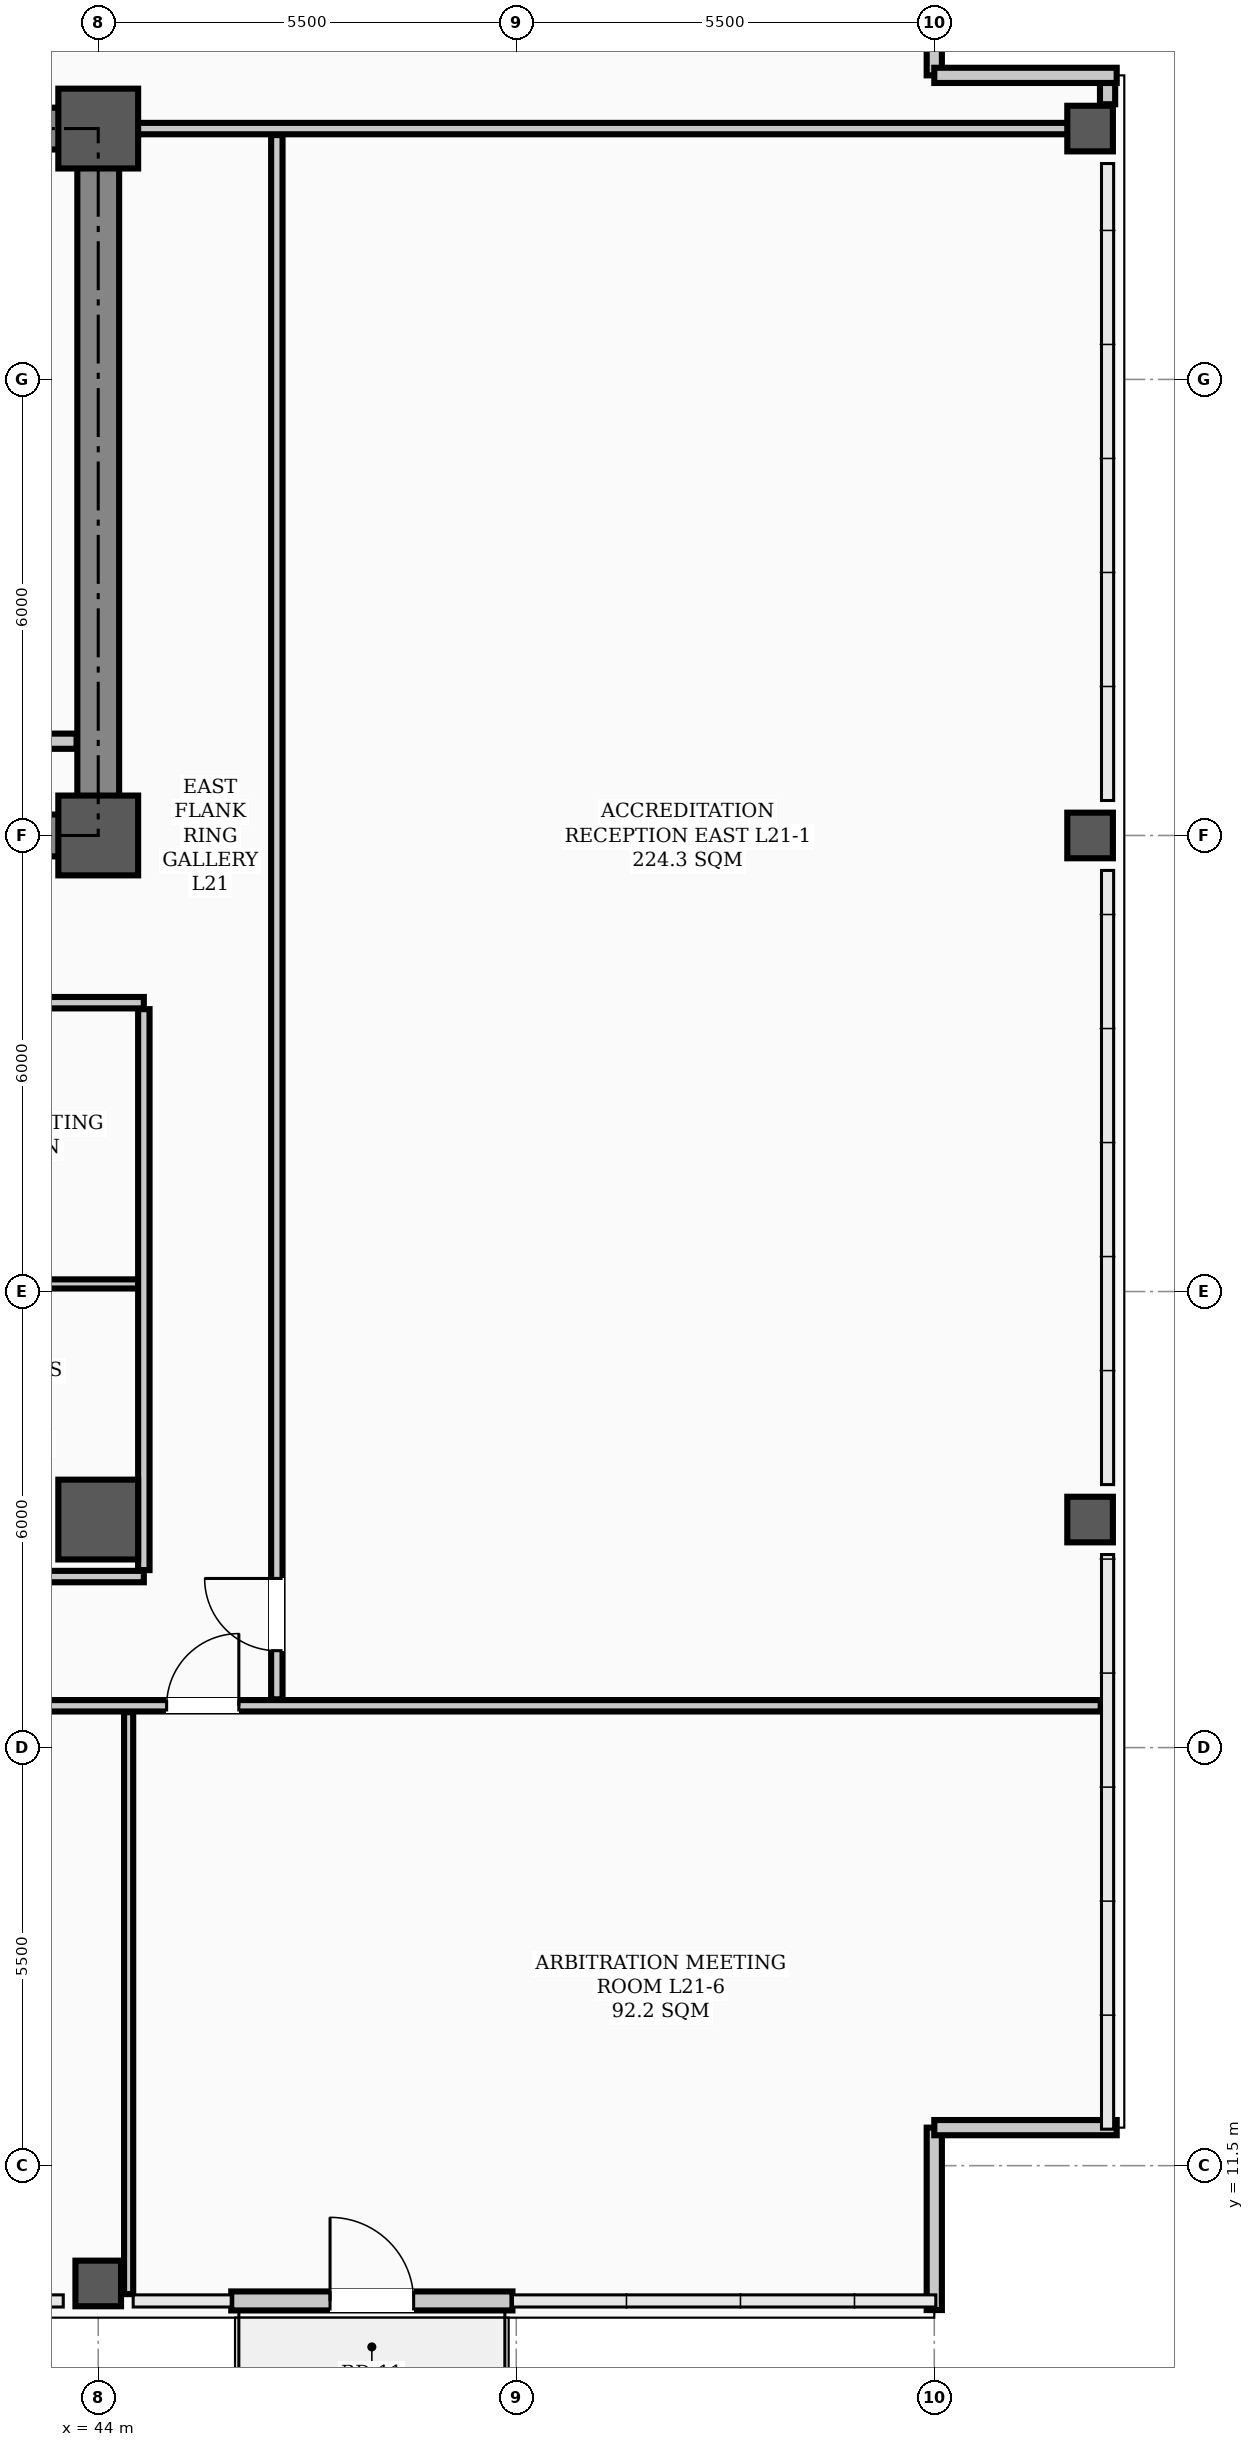
"""IFC4 building model, lengths in metres.
Left out: names, types, materials, properties, quantities, classifications, styles, units other than length and angle.
Written with IfcOpenShell. Run it as: python <this file> out.ifc"""

import sys

from ifc_helpers import new_model, si_unit, direction, frame, frame_2d, origin, origin_2d, place, context, subcontext, project, spatial, rectangle, hollow_rectangle, extrude, element, fill, save


model = new_model("IFC4")
c1 = context("Model", 3, precision=1e-05, world=origin(), true_north=direction((0.0, 1.0)))
c2 = subcontext(c1, "Body", "Model", "MODEL_VIEW")
j1 = project(units=[si_unit("LENGTHUNIT", "METRE"), si_unit("PLANEANGLEUNIT", "RADIAN")], contexts=[c1])
p1 = place(None, origin())
s1 = spatial("IfcSite", under=j1, at=p1, CompositionType="ELEMENT")
p2 = place(p1, origin())
s2 = spatial("IfcBuilding", under=s1, at=p2, CompositionType="ELEMENT")
p3 = place(p2, frame((0.0, 0.0, 85.0)))
s3 = spatial("IfcBuildingStorey", under=s2, at=p3, CompositionType="ELEMENT", Elevation=85.0)
for number, where, z_axis, x_axis in (
    (1, (44.0, 29.0, 0.0), (0.0, 0.0, 1.0), (1.0, 0.0, 0.0)),
    (2, (44.0, 38.3, 0.0), (0.0, 0.0, 1.0), (1.0, 0.0, 0.0)),
    (3, (44.0, 20.0, 0.0), (0.0, 0.0, 1.0), (1.0, 0.0, 0.0)),
):
    element("IfcColumn", number, at=place(p3, frame(where, z_axis=z_axis, x_axis=x_axis)), inside=s3, PredefinedType="COLUMN", context=c2, shape_type="SweptSolid", body=[
        extrude(hollow_rectangle(XDim=1.05, YDim=1.05, WallThickness=0.038, InnerFilletRadius=0.019, OuterFilletRadius=0.057, at=origin_2d()), origin(), (0.0, 0.0, 1.0), 3.9),
    ])
for number, where, z_axis, x_axis in (
    (4, (44.0, 9.95, 0.0), (0.0, 0.0, 1.0), (1.0, 0.0, 0.0)),
    (5, (57.05, 20.0, 0.0), (0.0, 0.0, 1.0), (1.0, 0.0, 0.0)),
    (6, (57.05, 29.0, 0.0), (0.0, 0.0, 1.0), (1.0, 0.0, 0.0)),
    (7, (57.05, 38.3, 0.0), (0.0, 0.0, 1.0), (1.0, 0.0, 0.0)),
):
    element("IfcColumn", number, at=place(p3, frame(where, z_axis=z_axis, x_axis=x_axis)), inside=s3, PredefinedType="COLUMN", context=c2, shape_type="SweptSolid", body=[
        extrude(hollow_rectangle(XDim=0.6, YDim=0.6, WallThickness=0.026, InnerFilletRadius=0.013, OuterFilletRadius=0.039, at=origin_2d()), origin(), (0.0, 0.0, 1.0), 3.9),
    ])
p4 = place(p3, frame((57.28, 38.62, 0.0), z_axis=(0.0, 0.0, 1.0), x_axis=(0.0, 1.0, 0.0)))
e8 = element("IfcWall", 8, at=p4, inside=s3, PredefinedType="PARAPET", context=c2, shape_type="SweptSolid", body=[
    extrude(rectangle(XDim=0.28, YDim=0.2, at=frame_2d((0.14, 0.0))), origin(), (0.0, 0.0, 1.0), 1.2),
])
for number, where, z_axis, x_axis in (
    (9, (55.0, 9.6, 0.0), (0.0, 0.0, 1.0), (0.0, 1.0, 0.0)),
    (10, (55.0, 12.0, 0.0), (0.0, 0.0, 1.0), (1.0, 0.0, 0.0)),
    (11, (55.0, 41.4, 0.0), (0.0, 0.0, 1.0), (0.0, -1.0, 0.0)),
    (12, (55.0, 39.0, 0.0), (0.0, 0.0, 1.0), (1.0, 0.0, 0.0)),
):
    element("IfcWall", number, at=place(p3, frame(where, z_axis=z_axis, x_axis=x_axis)), inside=s3, PredefinedType="PARAPET", context=c2, shape_type="SweptSolid", body=[
        extrude(rectangle(XDim=2.4, YDim=0.2, at=frame_2d((1.2, 0.0))), origin(), (0.0, 0.0, 1.0), 1.2),
    ])
p5 = place(p3, frame((45.75, 9.72, 0.0), z_axis=(0.0, 0.0, 1.0), x_axis=(1.0, 0.0, 0.0)))
e13 = element("IfcWall", 13, at=p5, inside=s3, PredefinedType="STANDARD", context=c2, shape_type="SweptSolid", body=[
    extrude(rectangle(XDim=3.7, YDim=0.25, at=frame_2d((1.85, 0.0))), origin(), (0.0, 0.0, 1.0), 3.18),
])
p6 = place(p5, frame((1.3, 0.0, 0.0)))
e14 = element("IfcOpeningElement", 14, at=p6, cuts=e13, PredefinedType="OPENING", context=c2, shape_type="SweptSolid", body=[
    extrude(rectangle(XDim=1.1, YDim=2.2, at=frame_2d((0.55, 1.1))), frame((0.0, 0.135, 0.0), z_axis=(0.0, -1.0, 0.0), x_axis=(1.0, 0.0, 0.0)), (0.0, 0.0, 1.0), 0.27),
])
p7 = place(p3, frame((13.5, 29.0, 0.0), z_axis=(0.0, 0.0, 1.0), x_axis=(1.0, 0.0, 0.0)))
e15 = element("IfcWall", 15, at=p7, inside=s3, PredefinedType="SHEAR", context=c2, shape_type="SweptSolid", body=[
    extrude(rectangle(XDim=30.5, YDim=0.55, at=frame_2d((15.25, 0.0))), origin(), (0.0, 0.0, 1.0), 3.72),
])
p8 = place(p7, frame((1.75, 0.0, 0.0)))
e16 = element("IfcOpeningElement", 16, at=p8, cuts=e15, PredefinedType="OPENING", context=c2, shape_type="SweptSolid", body=[
    extrude(rectangle(XDim=1.1, YDim=2.08, at=frame_2d((0.55, 1.04))), frame((0.0, 0.285, 0.0), z_axis=(0.0, -1.0, 0.0), x_axis=(1.0, 0.0, 0.0)), (0.0, 0.0, 1.0), 0.57),
])
p9 = place(p7, frame((26.7, 0.0, 0.0)))
e17 = element("IfcOpeningElement", 17, at=p9, cuts=e15, PredefinedType="OPENING", context=c2, shape_type="SweptSolid", body=[
    extrude(rectangle(XDim=1.1, YDim=2.08, at=frame_2d((0.55, 1.04))), frame((0.0, 0.285, 0.0), z_axis=(0.0, -1.0, 0.0), x_axis=(1.0, 0.0, 0.0)), (0.0, 0.0, 1.0), 0.57),
])
p10 = place(p7, frame((6.8, 0.0, 0.0)))
e18 = element("IfcOpeningElement", 18, at=p10, cuts=e15, PredefinedType="OPENING", context=c2, shape_type="SweptSolid", body=[
    extrude(rectangle(XDim=1.1, YDim=2.08, at=frame_2d((0.55, 1.04))), frame((0.0, 0.285, 0.0), z_axis=(0.0, -1.0, 0.0), x_axis=(1.0, 0.0, 0.0)), (0.0, 0.0, 1.0), 0.57),
])
p11 = place(p7, frame((13.2, 0.0, 0.0)))
e19 = element("IfcOpeningElement", 19, at=p11, cuts=e15, PredefinedType="OPENING", context=c2, shape_type="SweptSolid", body=[
    extrude(rectangle(XDim=1.6, YDim=2.08, at=frame_2d((0.8, 1.04))), frame((0.0, 0.285, 0.0), z_axis=(0.0, -1.0, 0.0), x_axis=(1.0, 0.0, 0.0)), (0.0, 0.0, 1.0), 0.57),
])
p12 = place(p7, frame((19.5, 0.0, 0.0)))
e20 = element("IfcOpeningElement", 20, at=p12, cuts=e15, PredefinedType="OPENING", context=c2, shape_type="SweptSolid", body=[
    extrude(rectangle(XDim=0.9, YDim=2.08, at=frame_2d((0.45, 1.04))), frame((0.0, 0.285, 0.0), z_axis=(0.0, -1.0, 0.0), x_axis=(1.0, 0.0, 0.0)), (0.0, 0.0, 1.0), 0.57),
])
p13 = place(p7, frame((21.55, 0.0, 0.0)))
e21 = element("IfcOpeningElement", 21, at=p13, cuts=e15, PredefinedType="OPENING", context=c2, shape_type="SweptSolid", body=[
    extrude(rectangle(XDim=0.9, YDim=2.08, at=frame_2d((0.45, 1.04))), frame((0.0, 0.285, 0.0), z_axis=(0.0, -1.0, 0.0), x_axis=(1.0, 0.0, 0.0)), (0.0, 0.0, 1.0), 0.57),
])
p14 = place(p3, frame((13.5, 38.3, 0.0), z_axis=(0.0, 0.0, 1.0), x_axis=(1.0, 0.0, 0.0)))
e22 = element("IfcWall", 22, at=p14, inside=s3, PredefinedType="SHEAR", context=c2, shape_type="SweptSolid", body=[
    extrude(rectangle(XDim=30.5, YDim=0.55, at=frame_2d((15.25, 0.0))), origin(), (0.0, 0.0, 1.0), 3.72),
])
p15 = place(p3, frame((44.0, 29.35, 0.0), z_axis=(0.0, 0.0, 1.0), x_axis=(0.0, 1.0, 0.0)))
e23 = element("IfcWall", 23, at=p15, inside=s3, PredefinedType="SHEAR", context=c2, shape_type="SweptSolid", body=[
    extrude(rectangle(XDim=8.6, YDim=0.55, at=frame_2d((4.3, 0.0))), origin(), (0.0, 0.0, 1.0), 3.72),
])
p16 = place(p3, frame((42.4, 30.24, 0.0), z_axis=(0.0, 0.0, 1.0), x_axis=(1.0, 0.0, 0.0)))
e24 = element("IfcWall", 24, at=p16, inside=s3, PredefinedType="STANDARD", context=c2, shape_type="SweptSolid", body=[
    extrude(rectangle(XDim=1.315, YDim=0.2, at=frame_2d((0.658, 0.0))), origin(), (0.0, 0.0, 1.0), 3.1),
])
p17 = place(p3, frame((12.9, 26.8, 0.0), z_axis=(0.0, 0.0, 1.0), x_axis=(1.0, 0.0, 0.0)))
e25 = element("IfcWall", 25, at=p17, inside=s3, PredefinedType="PARTITIONING", context=c2, shape_type="SweptSolid", body=[
    extrude(rectangle(XDim=31.7, YDim=0.15, at=frame_2d((15.85, 0.0))), origin(), (0.0, 0.0, 1.0), 3.1),
])
p18 = place(p17, frame((13.6, 0.0, 0.0)))
e26 = element("IfcOpeningElement", 26, at=p18, cuts=e25, PredefinedType="OPENING", context=c2, shape_type="SweptSolid", body=[
    extrude(rectangle(XDim=1.6, YDim=2.08, at=frame_2d((0.8, 1.04))), frame((0.0, 0.085, 0.0), z_axis=(0.0, -1.0, 0.0), x_axis=(1.0, 0.0, 0.0)), (0.0, 0.0, 1.0), 0.17),
])
p19 = place(p17, frame((3.275, 0.0, 0.0)))
e27 = element("IfcOpeningElement", 27, at=p19, cuts=e25, PredefinedType="OPENING", context=c2, shape_type="SweptSolid", body=[
    extrude(rectangle(XDim=0.95, YDim=2.08, at=frame_2d((0.475, 1.04))), frame((0.0, 0.085, 0.0), z_axis=(0.0, -1.0, 0.0), x_axis=(1.0, 0.0, 0.0)), (0.0, 0.0, 1.0), 0.17),
])
p20 = place(p17, frame((9.025, 0.0, 0.0)))
e28 = element("IfcOpeningElement", 28, at=p20, cuts=e25, PredefinedType="OPENING", context=c2, shape_type="SweptSolid", body=[
    extrude(rectangle(XDim=0.95, YDim=2.08, at=frame_2d((0.475, 1.04))), frame((0.0, 0.085, 0.0), z_axis=(0.0, -1.0, 0.0), x_axis=(1.0, 0.0, 0.0)), (0.0, 0.0, 1.0), 0.17),
])
p21 = place(p17, frame((19.525, 0.0, 0.0)))
e29 = element("IfcOpeningElement", 29, at=p21, cuts=e25, PredefinedType="OPENING", context=c2, shape_type="SweptSolid", body=[
    extrude(rectangle(XDim=0.95, YDim=2.08, at=frame_2d((0.475, 1.04))), frame((0.0, 0.085, 0.0), z_axis=(0.0, -1.0, 0.0), x_axis=(1.0, 0.0, 0.0)), (0.0, 0.0, 1.0), 0.17),
])
p22 = place(p17, frame((26.725, 0.0, 0.0)))
e30 = element("IfcOpeningElement", 30, at=p22, cuts=e25, PredefinedType="OPENING", context=c2, shape_type="SweptSolid", body=[
    extrude(rectangle(XDim=0.95, YDim=2.08, at=frame_2d((0.475, 1.04))), frame((0.0, 0.085, 0.0), z_axis=(0.0, -1.0, 0.0), x_axis=(1.0, 0.0, 0.0)), (0.0, 0.0, 1.0), 0.17),
])
p23 = place(p3, frame((7.81, 17.55, 0.0), z_axis=(0.0, 0.0, 1.0), x_axis=(1.0, 0.0, 0.0)))
e31 = element("IfcWall", 31, at=p23, inside=s3, PredefinedType="PARTITIONING", context=c2, shape_type="SweptSolid", body=[
    extrude(rectangle(XDim=49.38, YDim=0.15, at=frame_2d((24.69, 0.0))), origin(), (0.0, 0.0, 1.0), 3.1),
])
p24 = place(p23, frame((7.465, 0.0, 0.0)))
e32 = element("IfcOpeningElement", 32, at=p24, cuts=e31, PredefinedType="OPENING", context=c2, shape_type="SweptSolid", body=[
    extrude(rectangle(XDim=0.95, YDim=2.08, at=frame_2d((0.475, 1.04))), frame((0.0, 0.085, 0.0), z_axis=(0.0, -1.0, 0.0), x_axis=(1.0, 0.0, 0.0)), (0.0, 0.0, 1.0), 0.17),
])
p25 = place(p23, frame((11.915, 0.0, 0.0)))
e33 = element("IfcOpeningElement", 33, at=p25, cuts=e31, PredefinedType="OPENING", context=c2, shape_type="SweptSolid", body=[
    extrude(rectangle(XDim=0.95, YDim=2.08, at=frame_2d((0.475, 1.04))), frame((0.0, 0.085, 0.0), z_axis=(0.0, -1.0, 0.0), x_axis=(1.0, 0.0, 0.0)), (0.0, 0.0, 1.0), 0.17),
])
p26 = place(p23, frame((18.915, 0.0, 0.0)))
e34 = element("IfcOpeningElement", 34, at=p26, cuts=e31, PredefinedType="OPENING", context=c2, shape_type="SweptSolid", body=[
    extrude(rectangle(XDim=0.95, YDim=2.08, at=frame_2d((0.475, 1.04))), frame((0.0, 0.085, 0.0), z_axis=(0.0, -1.0, 0.0), x_axis=(1.0, 0.0, 0.0)), (0.0, 0.0, 1.0), 0.17),
])
p27 = place(p23, frame((26.015, 0.0, 0.0)))
e35 = element("IfcOpeningElement", 35, at=p27, cuts=e31, PredefinedType="OPENING", context=c2, shape_type="SweptSolid", body=[
    extrude(rectangle(XDim=0.95, YDim=2.08, at=frame_2d((0.475, 1.04))), frame((0.0, 0.085, 0.0), z_axis=(0.0, -1.0, 0.0), x_axis=(1.0, 0.0, 0.0)), (0.0, 0.0, 1.0), 0.17),
])
p28 = place(p23, frame((32.815, 0.0, 0.0)))
e36 = element("IfcOpeningElement", 36, at=p28, cuts=e31, PredefinedType="OPENING", context=c2, shape_type="SweptSolid", body=[
    extrude(rectangle(XDim=0.95, YDim=2.08, at=frame_2d((0.475, 1.04))), frame((0.0, 0.085, 0.0), z_axis=(0.0, -1.0, 0.0), x_axis=(1.0, 0.0, 0.0)), (0.0, 0.0, 1.0), 0.17),
])
p29 = place(p23, frame((37.09, 0.0, 0.0)))
e37 = element("IfcOpeningElement", 37, at=p29, cuts=e31, PredefinedType="OPENING", context=c2, shape_type="SweptSolid", body=[
    extrude(rectangle(XDim=0.95, YDim=2.08, at=frame_2d((0.475, 1.04))), frame((0.0, 0.085, 0.0), z_axis=(0.0, -1.0, 0.0), x_axis=(1.0, 0.0, 0.0)), (0.0, 0.0, 1.0), 0.17),
])
p30 = place(p3, frame((28.4, 19.25, 0.0), z_axis=(0.0, 0.0, 1.0), x_axis=(1.0, 0.0, 0.0)))
e38 = element("IfcWall", 38, at=p30, inside=s3, PredefinedType="PARTITIONING", context=c2, shape_type="SweptSolid", body=[
    extrude(rectangle(XDim=16.2, YDim=0.15, at=frame_2d((8.1, 0.0))), origin(), (0.0, 0.0, 1.0), 3.1),
])
p31 = place(p30, frame((4.025, 0.0, 0.0)))
e39 = element("IfcOpeningElement", 39, at=p31, cuts=e38, PredefinedType="OPENING", context=c2, shape_type="SweptSolid", body=[
    extrude(rectangle(XDim=0.95, YDim=2.08, at=frame_2d((0.475, 1.04))), frame((0.0, 0.085, 0.0), z_axis=(0.0, -1.0, 0.0), x_axis=(1.0, 0.0, 0.0)), (0.0, 0.0, 1.0), 0.17),
])
p32 = place(p30, frame((11.225, 0.0, 0.0)))
e40 = element("IfcOpeningElement", 40, at=p32, cuts=e38, PredefinedType="OPENING", context=c2, shape_type="SweptSolid", body=[
    extrude(rectangle(XDim=0.95, YDim=2.08, at=frame_2d((0.475, 1.04))), frame((0.0, 0.085, 0.0), z_axis=(0.0, -1.0, 0.0), x_axis=(1.0, 0.0, 0.0)), (0.0, 0.0, 1.0), 0.17),
])
p33 = place(p3, frame((44.0, 38.3, 0.0), z_axis=(0.0, 0.0, 1.0), x_axis=(1.0, 0.0, 0.0)))
e41 = element("IfcWall", 41, at=p33, inside=s3, PredefinedType="PARTITIONING", context=c2, shape_type="SweptSolid", body=[
    extrude(rectangle(XDim=13.19, YDim=0.15, at=frame_2d((6.595, 0.0))), origin(), (0.0, 0.0, 1.0), 3.0),
])
p34 = place(p3, frame((35.6, 23.1, 0.0), z_axis=(0.0, 0.0, 1.0), x_axis=(1.0, 0.0, 0.0)))
e42 = element("IfcWall", 42, at=p34, inside=s3, PredefinedType="PARTITIONING", context=c2, shape_type="SweptSolid", body=[
    extrude(rectangle(XDim=9.0, YDim=0.12, at=frame_2d((4.5, 0.0))), origin(), (0.0, 0.0, 1.0), 3.1),
])
p35 = place(p3, frame((46.35, 17.635, 0.0), z_axis=(0.0, 0.0, 1.0), x_axis=(0.0, 1.0, 0.0)))
e43 = element("IfcWall", 43, at=p35, inside=s3, PredefinedType="PARTITIONING", context=c2, shape_type="SweptSolid", body=[
    extrude(rectangle(XDim=20.58, YDim=0.15, at=frame_2d((10.29, 0.0))), origin(), (0.0, 0.0, 1.0), 3.0),
])
p36 = place(p35, frame((0.64, 0.0, 0.0)))
e44 = element("IfcOpeningElement", 44, at=p36, cuts=e43, PredefinedType="OPENING", context=c2, shape_type="SweptSolid", body=[
    extrude(rectangle(XDim=0.95, YDim=2.08, at=frame_2d((0.475, 1.04))), frame((0.0, 0.085, 0.0), z_axis=(0.0, -1.0, 0.0), x_axis=(1.0, 0.0, 0.0)), (0.0, 0.0, 1.0), 0.17),
])
p37 = place(p3, frame((44.6, 19.335, 0.0), z_axis=(0.0, 0.0, 1.0), x_axis=(0.0, 1.0, 0.0)))
e45 = element("IfcWall", 45, at=p37, inside=s3, PredefinedType="PARTITIONING", context=c2, shape_type="SweptSolid", body=[
    extrude(rectangle(XDim=7.38, YDim=0.15, at=frame_2d((3.69, 0.0))), origin(), (0.0, 0.0, 1.0), 3.0),
])
p38 = place(p3, frame((44.4, 9.81, 0.0), z_axis=(0.0, 0.0, 1.0), x_axis=(0.0, 1.0, 0.0)))
e46 = element("IfcWall", 46, at=p38, inside=s3, PredefinedType="PARTITIONING", context=c2, shape_type="SweptSolid", body=[
    extrude(rectangle(XDim=7.655, YDim=0.12, at=frame_2d((3.828, 0.0))), origin(), (0.0, 0.0, 1.0), 3.1),
])
p39 = place(p6, origin())
e47 = element("IfcDoor", 47, at=p39, inside=s3, OperationType="SINGLE_SWING_LEFT", PredefinedType="DOOR", context=c2, shape_type="SweptSolid", body=[
    extrude(rectangle(XDim=1.1, YDim=2.2, at=frame_2d((0.55, 1.1))), frame((0.0, 0.025, 0.0), z_axis=(0.0, -1.0, 0.0), x_axis=(1.0, 0.0, 0.0)), (0.0, 0.0, 1.0), 0.05),
])
fill(e14, e47)
p40 = place(p29, origin())
e48 = element("IfcDoor", 48, at=p40, inside=s3, OperationType="SINGLE_SWING_RIGHT", PredefinedType="DOOR", context=c2, shape_type="SweptSolid", body=[
    extrude(rectangle(XDim=0.95, YDim=2.08, at=frame_2d((0.475, 1.04))), frame((0.0, 0.025, 0.0), z_axis=(0.0, -1.0, 0.0), x_axis=(1.0, 0.0, 0.0)), (0.0, 0.0, 1.0), 0.05),
])
fill(e37, e48)
p41 = place(p36, origin())
e49 = element("IfcDoor", 49, at=p41, inside=s3, OperationType="SINGLE_SWING_RIGHT", PredefinedType="DOOR", context=c2, shape_type="SweptSolid", body=[
    extrude(rectangle(XDim=0.95, YDim=2.08, at=frame_2d((0.475, 1.04))), frame((0.0, 0.025, 0.0), z_axis=(0.0, -1.0, 0.0), x_axis=(1.0, 0.0, 0.0)), (0.0, 0.0, 1.0), 0.05),
])
fill(e44, e49)
save(model, sys.argv[1])
